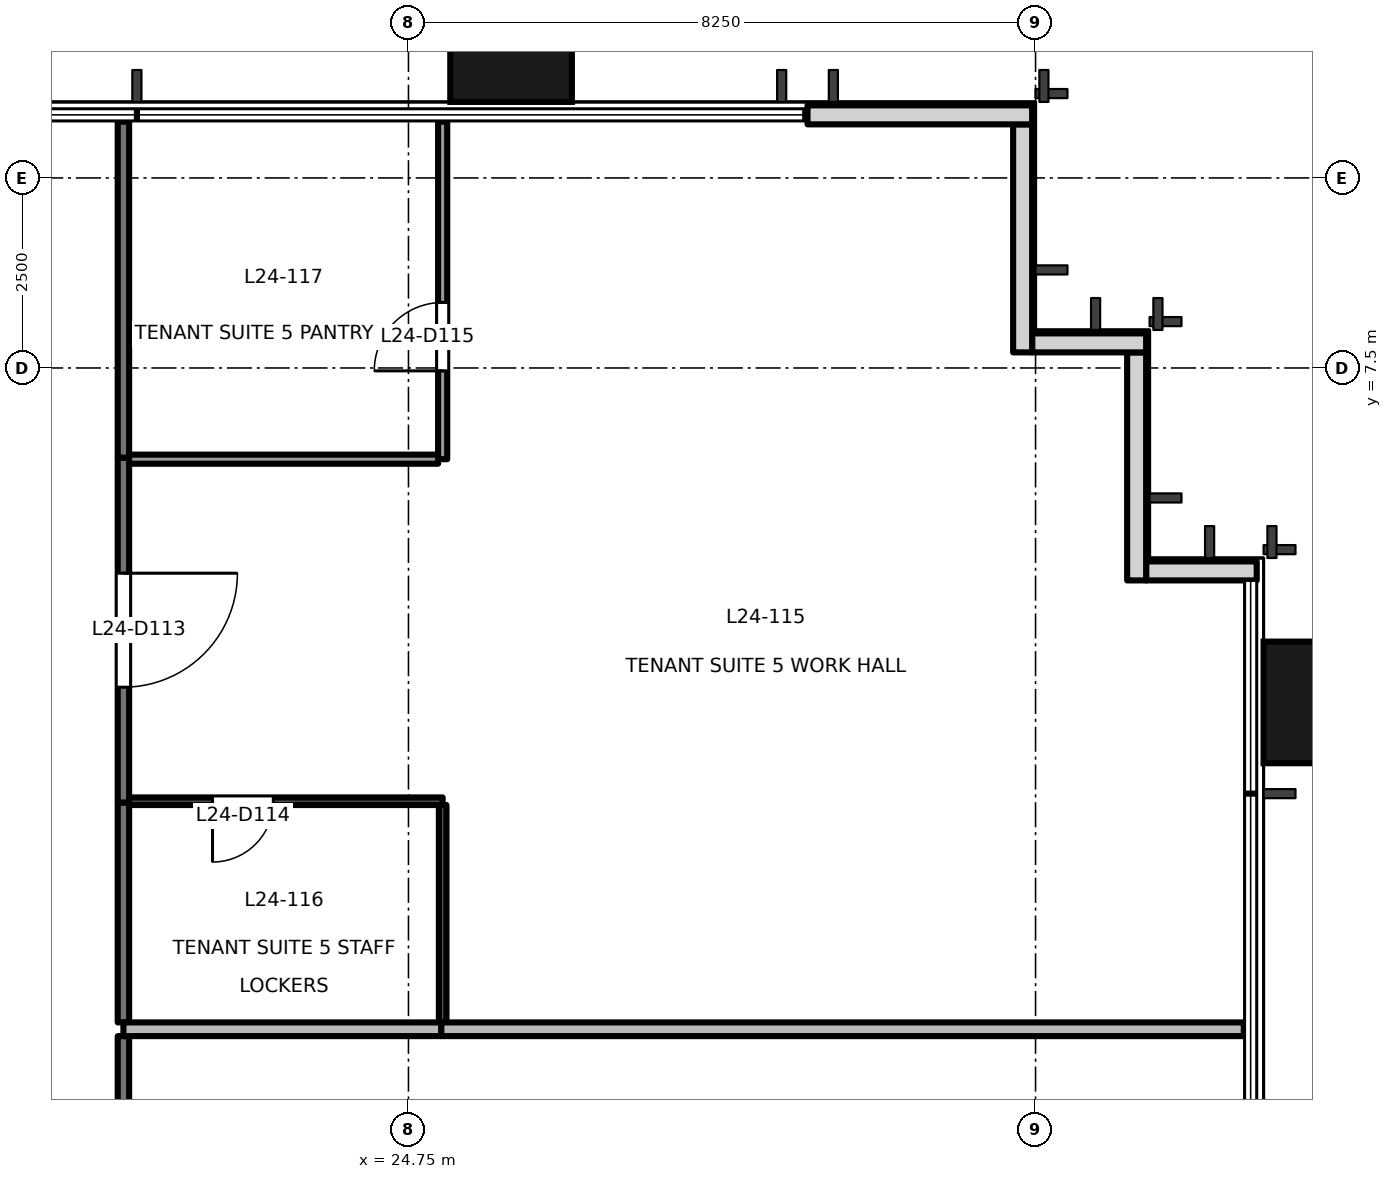
"""IFC4 building model, lengths in metres.
Left out: names, types, materials, properties, quantities, classifications, styles, units other than length and angle.
Written with IfcOpenShell. Run it as: python <this file> out.ifc"""

import sys

from ifc_helpers import new_model, si_unit, direction, frame, frame_2d, origin, origin_2d, place, context, subcontext, project, spatial, rectangle, extrude, element, fill, save


model = new_model("IFC4")
c1 = context("Model", 3, precision=1e-05, world=origin(), true_north=direction((0.0, 1.0)))
c2 = subcontext(c1, "Body", "Model", "MODEL_VIEW")
j1 = project(units=[si_unit("LENGTHUNIT", "METRE"), si_unit("PLANEANGLEUNIT", "RADIAN")], contexts=[c1])
p1 = place(None, origin())
s1 = spatial("IfcSite", under=j1, at=p1, CompositionType="ELEMENT")
p2 = place(p1, origin())
s2 = spatial("IfcBuilding", under=s1, at=p2, CompositionType="ELEMENT")
p3 = place(p2, frame((0.0, 0.0, 107.7)))
s3 = spatial("IfcBuildingStorey", under=s2, at=p3, CompositionType="ELEMENT", Elevation=107.7)
for number, where, z_axis, x_axis in (
    (1, (36.9, 3.1, -0.2), (0.0, 0.0, 1.0), (0.0, 1.0, 0.0)),
    (2, (26.1, 11.9, -0.2), (0.0, 0.0, 1.0), (1.0, 0.0, 0.0)),
):
    element("IfcColumn", number, at=place(p3, frame(where, z_axis=z_axis, x_axis=x_axis)), inside=s3, PredefinedType="COLUMN", context=c2, shape_type="SweptSolid", body=[
        extrude(rectangle(XDim=1.6, YDim=1.8, at=origin_2d()), origin(), (0.0, 0.0, 1.0), 4.0),
    ])
p4 = place(p3, frame((35.91, 4.83, 0.0), z_axis=(0.0, 0.0, 1.0), x_axis=(-1.0, 0.0, 0.0)))
e3 = element("IfcWall", 3, at=p4, inside=s3, PredefinedType="SOLIDWALL", context=c2, shape_type="SweptSolid", body=[
    extrude(rectangle(XDim=1.455, YDim=0.25, at=frame_2d((0.728, 0.0))), origin(), (0.0, 0.0, 1.0), 3.8),
])
p5 = place(p3, frame((34.33, 4.705, 0.0), z_axis=(0.0, 0.0, 1.0), x_axis=(0.0, 1.0, 0.0)))
e4 = element("IfcWall", 4, at=p5, inside=s3, PredefinedType="SOLIDWALL", context=c2, shape_type="SweptSolid", body=[
    extrude(rectangle(XDim=3.0, YDim=0.25, at=frame_2d((1.5, 0.0))), origin(), (0.0, 0.0, 1.0), 3.8),
])
p6 = place(p3, frame((34.455, 7.83, 0.0), z_axis=(0.0, 0.0, 1.0), x_axis=(-1.0, 0.0, 0.0)))
e5 = element("IfcWall", 5, at=p6, inside=s3, PredefinedType="SOLIDWALL", context=c2, shape_type="SweptSolid", body=[
    extrude(rectangle(XDim=1.5, YDim=0.25, at=frame_2d((0.75, 0.0))), origin(), (0.0, 0.0, 1.0), 3.8),
])
p7 = place(p3, frame((32.83, 7.705, 0.0), z_axis=(0.0, 0.0, 1.0), x_axis=(0.0, 1.0, 0.0)))
e6 = element("IfcWall", 6, at=p7, inside=s3, PredefinedType="SOLIDWALL", context=c2, shape_type="SweptSolid", body=[
    extrude(rectangle(XDim=3.0, YDim=0.25, at=frame_2d((1.5, 0.0))), origin(), (0.0, 0.0, 1.0), 3.8),
])
p8 = place(p3, frame((32.955, 10.83, 0.0), z_axis=(0.0, 0.0, 1.0), x_axis=(-1.0, 0.0, 0.0)))
e7 = element("IfcWall", 7, at=p8, inside=s3, PredefinedType="SOLIDWALL", context=c2, shape_type="SweptSolid", body=[
    extrude(rectangle(XDim=2.955, YDim=0.25, at=frame_2d((1.478, 0.0))), origin(), (0.0, 0.0, 1.0), 3.8),
])
p9 = place(p3, frame((21.0, -1.29, 0.0), z_axis=(0.0, 0.0, 1.0), x_axis=(0.0, -1.0, 0.0)))
e8 = element("IfcWall", 8, at=p9, inside=s3, PredefinedType="PARTITIONING", context=c2, shape_type="SweptSolid", body=[
    extrude(rectangle(XDim=6.23, YDim=0.15, at=frame_2d((3.115, 0.0))), origin(), (0.0, 0.0, 1.0), 2.9),
])
p10 = place(p9, frame((1.307, 0.0, 0.0)))
e9 = element("IfcOpeningElement", 9, at=p10, cuts=e8, PredefinedType="OPENING", context=c2, shape_type="SweptSolid", body=[
    extrude(rectangle(XDim=1.5, YDim=2.1, at=frame_2d((0.75, 1.05))), frame((0.0, 0.085, 0.0), z_axis=(0.0, -1.0, 0.0), x_axis=(1.0, 0.0, 0.0)), (0.0, 0.0, 1.0), 0.171),
])
p11 = place(p3, frame((21.0, 6.32, 0.0), z_axis=(0.0, 0.0, 1.0), x_axis=(0.0, -1.0, 0.0)))
e10 = element("IfcWall", 10, at=p11, inside=s3, PredefinedType="PARTITIONING", context=c2, shape_type="SweptSolid", body=[
    extrude(rectangle(XDim=4.54, YDim=0.15, at=frame_2d((2.27, 0.0))), origin(), (0.0, 0.0, 1.0), 2.9),
])
p12 = place(p11, frame((1.52, 0.0, 0.0)))
e11 = element("IfcOpeningElement", 11, at=p12, cuts=e10, PredefinedType="OPENING", context=c2, shape_type="SweptSolid", body=[
    extrude(rectangle(XDim=1.5, YDim=2.1, at=frame_2d((0.75, 1.05))), frame((0.0, 0.085, 0.0), z_axis=(0.0, -1.0, 0.0), x_axis=(1.0, 0.0, 0.0)), (0.0, 0.0, 1.0), 0.171),
])
p13 = place(p3, frame((21.0, 1.78, 0.0), z_axis=(0.0, 0.0, 1.0), x_axis=(0.0, -1.0, 0.0)))
e12 = element("IfcWall", 12, at=p13, inside=s3, PredefinedType="PARTITIONING", context=c2, shape_type="SweptSolid", body=[
    extrude(rectangle(XDim=2.89, YDim=0.15, at=frame_2d((1.445, 0.0))), origin(), (0.0, 0.0, 1.0), 2.9),
])
p14 = place(p3, frame((21.0, 10.74, 0.0), z_axis=(0.0, 0.0, 1.0), x_axis=(0.0, -1.0, 0.0)))
e13 = element("IfcWall", 13, at=p14, inside=s3, PredefinedType="PARTITIONING", context=c2, shape_type="SweptSolid", body=[
    extrude(rectangle(XDim=4.42, YDim=0.15, at=frame_2d((2.21, 0.0))), origin(), (0.0, 0.0, 1.0), 3.8),
])
p15 = place(p3, frame((25.18, -1.2, 0.0), z_axis=(0.0, 0.0, 1.0), x_axis=(1.0, 0.0, 0.0)))
e14 = element("IfcWall", 14, at=p15, inside=s3, PredefinedType="PARTITIONING", context=c2, shape_type="SweptSolid", body=[
    extrude(rectangle(XDim=10.56, YDim=0.18, at=frame_2d((5.28, 0.0))), origin(), (0.0, 0.0, 1.0), 3.8),
])
p16 = place(p3, frame((21.0, -1.2, 0.0), z_axis=(0.0, 0.0, 1.0), x_axis=(1.0, 0.0, 0.0)))
e15 = element("IfcWall", 15, at=p16, inside=s3, PredefinedType="PARTITIONING", context=c2, shape_type="SweptSolid", body=[
    extrude(rectangle(XDim=4.18, YDim=0.18, at=frame_2d((2.09, 0.0))), origin(), (0.0, 0.0, 1.0), 3.8),
])
p17 = place(p3, frame((25.2, 1.8, 0.0), z_axis=(0.0, 0.0, 1.0), x_axis=(-1.0, 0.0, 0.0)))
e16 = element("IfcWall", 16, at=p17, inside=s3, PredefinedType="PARTITIONING", context=c2, shape_type="SweptSolid", body=[
    extrude(rectangle(XDim=4.125, YDim=0.1, at=frame_2d((2.062, 0.0))), origin(), (0.0, 0.0, 1.0), 3.8),
])
p18 = place(p17, frame((2.228, 0.0, 0.0)))
e17 = element("IfcOpeningElement", 17, at=p18, cuts=e16, PredefinedType="OPENING", context=c2, shape_type="SweptSolid", body=[
    extrude(rectangle(XDim=0.8, YDim=2.1, at=frame_2d((0.4, 1.05))), frame((0.0, 0.061, 0.0), z_axis=(0.0, -1.0, 0.0), x_axis=(1.0, 0.0, 0.0)), (0.0, 0.0, 1.0), 0.121),
])
p19 = place(p3, frame((25.2, -1.11, 0.0), z_axis=(0.0, 0.0, 1.0), x_axis=(0.0, 1.0, 0.0)))
e18 = element("IfcWall", 18, at=p19, inside=s3, PredefinedType="PARTITIONING", context=c2, shape_type="SweptSolid", body=[
    extrude(rectangle(XDim=2.86, YDim=0.1, at=frame_2d((1.43, 0.0))), origin(), (0.0, 0.0, 1.0), 2.9),
])
p20 = place(p3, frame((21.075, 6.3, 0.0), z_axis=(0.0, 0.0, 1.0), x_axis=(1.0, 0.0, 0.0)))
e19 = element("IfcWall", 19, at=p20, inside=s3, PredefinedType="PARTITIONING", context=c2, shape_type="SweptSolid", body=[
    extrude(rectangle(XDim=4.065, YDim=0.12, at=frame_2d((2.032, 0.0))), origin(), (0.0, 0.0, 1.0), 3.8),
])
p21 = place(p3, frame((25.2, 6.3, 0.0), z_axis=(0.0, 0.0, 1.0), x_axis=(0.0, 1.0, 0.0)))
e20 = element("IfcWall", 20, at=p21, inside=s3, PredefinedType="PARTITIONING", context=c2, shape_type="SweptSolid", body=[
    extrude(rectangle(XDim=4.44, YDim=0.12, at=frame_2d((2.22, 0.0))), origin(), (0.0, 0.0, 1.0), 3.8),
])
p22 = place(p21, frame((1.162, 0.0, 0.0)))
e21 = element("IfcOpeningElement", 21, at=p22, cuts=e20, PredefinedType="OPENING", context=c2, shape_type="SweptSolid", body=[
    extrude(rectangle(XDim=0.9, YDim=2.1, at=frame_2d((0.45, 1.05))), frame((0.0, 0.071, 0.0), z_axis=(0.0, -1.0, 0.0), x_axis=(1.0, 0.0, 0.0)), (0.0, 0.0, 1.0), 0.141),
])
p23 = place(p12, origin())
e22 = element("IfcDoor", 22, at=p23, inside=s3, OperationType="DOUBLE_DOOR_SINGLE_SWING", PredefinedType="DOOR", context=c2, shape_type="SweptSolid", body=[
    extrude(rectangle(XDim=1.5, YDim=2.1, at=frame_2d((0.75, 1.05))), frame((0.0, 0.025, 0.0), z_axis=(0.0, -1.0, 0.0), x_axis=(1.0, 0.0, 0.0)), (0.0, 0.0, 1.0), 0.05),
])
fill(e11, e22)
p24 = place(p18, origin())
e23 = element("IfcDoor", 23, at=p24, inside=s3, OperationType="SINGLE_SWING_RIGHT", PredefinedType="DOOR", context=c2, shape_type="SweptSolid", body=[
    extrude(rectangle(XDim=0.8, YDim=2.1, at=frame_2d((0.4, 1.05))), frame((0.0, 0.025, 0.0), z_axis=(0.0, -1.0, 0.0), x_axis=(1.0, 0.0, 0.0)), (0.0, 0.0, 1.0), 0.05),
])
fill(e17, e23)
p25 = place(p22, origin())
e24 = element("IfcDoor", 24, at=p25, inside=s3, OperationType="SINGLE_SWING_LEFT", PredefinedType="DOOR", context=c2, shape_type="SweptSolid", body=[
    extrude(rectangle(XDim=0.9, YDim=2.1, at=frame_2d((0.45, 1.05))), frame((0.0, 0.025, 0.0), z_axis=(0.0, -1.0, 0.0), x_axis=(1.0, 0.0, 0.0)), (0.0, 0.0, 1.0), 0.05),
])
fill(e21, e24)
save(model, sys.argv[1])
